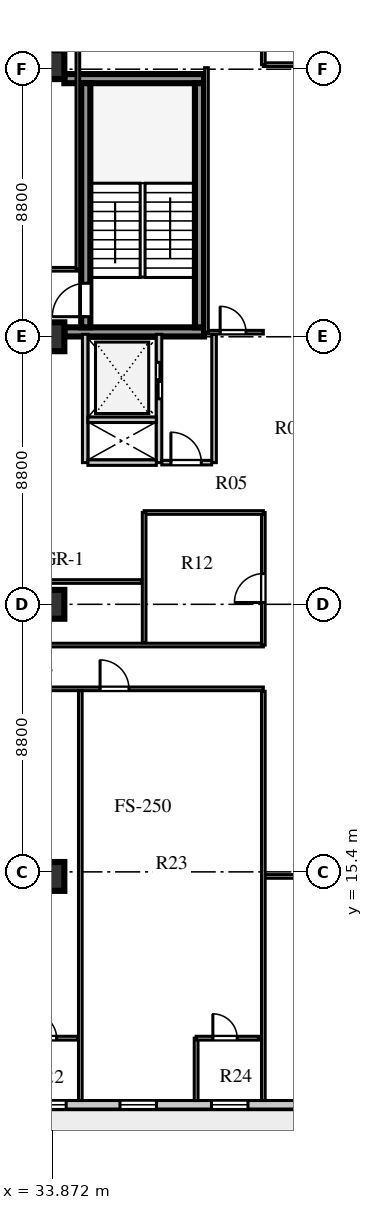
"""IFC4 building model, lengths in metres.
Left out: names, types, materials, properties, quantities, classifications, styles, units other than length and angle.
Written with IfcOpenShell. Run it as: python <this file> out.ifc"""

import sys

from ifc_helpers import new_model, si_unit, direction, frame, frame_2d, origin, origin_2d, place, context, subcontext, project, spatial, rectangle, extrude, element, fill, save


model = new_model("IFC4")
c1 = context("Model", 3, precision=1e-05, world=origin(), true_north=direction((0.0, 1.0)))
c2 = subcontext(c1, "Body", "Model", "MODEL_VIEW")
j1 = project(units=[si_unit("LENGTHUNIT", "METRE"), si_unit("PLANEANGLEUNIT", "RADIAN")], contexts=[c1])
p1 = place(None, origin())
s1 = spatial("IfcSite", under=j1, at=p1, CompositionType="ELEMENT")
p2 = place(p1, origin())
s2 = spatial("IfcBuilding", under=s1, at=p2, CompositionType="ELEMENT")
p3 = place(p2, frame((0.0, 0.0, 173.3)))
s3 = spatial("IfcBuildingStorey", under=s2, at=p3, CompositionType="ELEMENT", Elevation=173.3)
for number, where, z_axis, x_axis in (
    (1, (34.275, 33.16, 0.0), (0.0, 0.0, 1.0), (1.0, 0.0, 0.0)),
    (2, (34.275, 41.49, 0.0), (0.0, 0.0, 1.0), (1.0, 0.0, 0.0)),
):
    element("IfcWall", number, at=place(p3, frame(where, z_axis=z_axis, x_axis=x_axis)), inside=s3, PredefinedType="SHEAR", context=c2, shape_type="SweptSolid", body=[
        extrude(rectangle(XDim=4.595, YDim=0.3, at=frame_2d((2.298, 0.0))), origin(), (0.0, 0.0, 1.0), 3.6),
    ])
p4 = place(p3, frame((34.98, 33.31, 0.0), z_axis=(0.0, 0.0, 1.0), x_axis=(0.0, 1.0, 0.0)))
e3 = element("IfcWall", 3, at=p4, inside=s3, PredefinedType="SHEAR", context=c2, shape_type="SweptSolid", body=[
    extrude(rectangle(XDim=8.03, YDim=0.3, at=frame_2d((4.015, 0.0))), origin(), (0.0, 0.0, 1.0), 3.6),
])
p5 = place(p4, frame((0.35, 0.0, 0.0)))
e4 = element("IfcOpeningElement", 4, at=p5, cuts=e3, PredefinedType="OPENING", context=c2, shape_type="SweptSolid", body=[
    extrude(rectangle(XDim=1.1, YDim=2.1, at=frame_2d((0.55, 1.05))), frame((0.0, 0.16, 0.0), z_axis=(0.0, -1.0, 0.0), x_axis=(1.0, 0.0, 0.0)), (0.0, 0.0, 1.0), 0.32),
])
p6 = place(p3, frame((38.72, 33.31, 0.0), z_axis=(0.0, 0.0, 1.0), x_axis=(0.0, 1.0, 0.0)))
e5 = element("IfcWall", 5, at=p6, inside=s3, PredefinedType="SHEAR", context=c2, shape_type="SweptSolid", body=[
    extrude(rectangle(XDim=8.03, YDim=0.3, at=frame_2d((4.015, 0.0))), origin(), (0.0, 0.0, 1.0), 3.6),
])
for number, where, z_axis, x_axis in (
    (6, (33.8, 15.25, 0.0), (0.0, 0.0, 1.0), (1.0, 0.0, 0.0)),
    (7, (33.8, 24.2, 0.0), (0.0, 0.0, 1.0), (1.0, 0.0, 0.0)),
    (8, (33.8, 33.0, 0.0), (0.0, 0.0, 1.0), (1.0, 0.0, 0.0)),
    (9, (33.8, 41.95, 0.0), (0.0, 0.0, 1.0), (1.0, 0.0, 0.0)),
):
    element("IfcColumn", number, at=place(p3, frame(where, z_axis=z_axis, x_axis=x_axis)), inside=s3, PredefinedType="COLUMN", context=c2, shape_type="SweptSolid", body=[
        extrude(rectangle(XDim=0.95, YDim=0.95, at=origin_2d()), origin(), (0.0, 0.0, 1.0), 3.6),
    ])
p7 = place(p3, frame((13.05, 7.74, 0.0), z_axis=(0.0, 0.0, 1.0), x_axis=(1.0, 0.0, 0.0)))
e10 = element("IfcWall", 10, at=p7, inside=s3, PredefinedType="STANDARD", context=c2, shape_type="SweptSolid", body=[
    extrude(rectangle(XDim=32.5, YDim=0.28, at=frame_2d((16.25, 0.0))), origin(), (0.0, 0.0, 1.0), 3.6),
])
p8 = place(p7, frame((0.95, 0.0, 0.0)))
e11 = element("IfcOpeningElement", 11, at=p8, cuts=e10, PredefinedType="OPENING", context=c2, shape_type="SweptSolid", body=[
    extrude(rectangle(XDim=1.0, YDim=2.05, at=frame_2d((0.5, 1.025))), frame((0.0, 0.15, 0.0), z_axis=(0.0, -1.0, 0.0), x_axis=(1.0, 0.0, 0.0)), (0.0, 0.0, 1.0), 0.3),
])
p9 = place(p7, frame((6.205, 0.0, 0.8)))
e12 = element("IfcOpeningElement", 12, at=p9, cuts=e10, PredefinedType="OPENING", context=c2, shape_type="SweptSolid", body=[
    extrude(rectangle(XDim=1.65, YDim=1.95, at=frame_2d((0.825, 0.975))), frame((0.0, 0.15, 0.0), z_axis=(0.0, -1.0, 0.0), x_axis=(1.0, 0.0, 0.0)), (0.0, 0.0, 1.0), 0.3),
])
p10 = place(p7, frame((12.72, 0.0, 0.8)))
e13 = element("IfcOpeningElement", 13, at=p10, cuts=e10, PredefinedType="OPENING", context=c2, shape_type="SweptSolid", body=[
    extrude(rectangle(XDim=0.95, YDim=1.65, at=frame_2d((0.475, 0.825))), frame((0.0, 0.15, 0.0), z_axis=(0.0, -1.0, 0.0), x_axis=(1.0, 0.0, 0.0)), (0.0, 0.0, 1.0), 0.3),
])
p11 = place(p7, frame((14.685, 0.0, 0.8)))
e14 = element("IfcOpeningElement", 14, at=p11, cuts=e10, PredefinedType="OPENING", context=c2, shape_type="SweptSolid", body=[
    extrude(rectangle(XDim=1.2, YDim=1.75, at=frame_2d((0.6, 0.875))), frame((0.0, 0.15, 0.0), z_axis=(0.0, -1.0, 0.0), x_axis=(1.0, 0.0, 0.0)), (0.0, 0.0, 1.0), 0.3),
])
p12 = place(p7, frame((17.085, 0.0, 0.8)))
e15 = element("IfcOpeningElement", 15, at=p12, cuts=e10, PredefinedType="OPENING", context=c2, shape_type="SweptSolid", body=[
    extrude(rectangle(XDim=1.8, YDim=2.0, at=frame_2d((0.9, 1.0))), frame((0.0, 0.15, 0.0), z_axis=(0.0, -1.0, 0.0), x_axis=(1.0, 0.0, 0.0)), (0.0, 0.0, 1.0), 0.3),
])
p13 = place(p7, frame((20.085, 0.0, 0.8)))
e16 = element("IfcOpeningElement", 16, at=p13, cuts=e10, PredefinedType="OPENING", context=c2, shape_type="SweptSolid", body=[
    extrude(rectangle(XDim=1.2, YDim=1.75, at=frame_2d((0.6, 0.875))), frame((0.0, 0.15, 0.0), z_axis=(0.0, -1.0, 0.0), x_axis=(1.0, 0.0, 0.0)), (0.0, 0.0, 1.0), 0.3),
])
p14 = place(p7, frame((23.055, 0.0, 0.8)))
e17 = element("IfcOpeningElement", 17, at=p14, cuts=e10, PredefinedType="OPENING", context=c2, shape_type="SweptSolid", body=[
    extrude(rectangle(XDim=1.2, YDim=1.75, at=frame_2d((0.6, 0.875))), frame((0.0, 0.15, 0.0), z_axis=(0.0, -1.0, 0.0), x_axis=(1.0, 0.0, 0.0)), (0.0, 0.0, 1.0), 0.3),
])
p15 = place(p7, frame((26.065, 0.0, 0.8)))
e18 = element("IfcOpeningElement", 18, at=p15, cuts=e10, PredefinedType="OPENING", context=c2, shape_type="SweptSolid", body=[
    extrude(rectangle(XDim=1.2, YDim=1.75, at=frame_2d((0.6, 0.875))), frame((0.0, 0.15, 0.0), z_axis=(0.0, -1.0, 0.0), x_axis=(1.0, 0.0, 0.0)), (0.0, 0.0, 1.0), 0.3),
])
p16 = place(p7, frame((29.03, 0.0, 0.8)))
e19 = element("IfcOpeningElement", 19, at=p16, cuts=e10, PredefinedType="OPENING", context=c2, shape_type="SweptSolid", body=[
    extrude(rectangle(XDim=2.1, YDim=1.95, at=frame_2d((1.05, 0.975))), frame((0.0, 0.15, 0.0), z_axis=(0.0, -1.0, 0.0), x_axis=(1.0, 0.0, 0.0)), (0.0, 0.0, 1.0), 0.3),
])
p17 = place(p3, frame((34.96, 28.86, 0.0), z_axis=(0.0, 0.0, 1.0), x_axis=(0.0, 1.0, 0.0)))
e20 = element("IfcWall", 20, at=p17, inside=s3, PredefinedType="SOLIDWALL", context=c2, shape_type="SweptSolid", body=[
    extrude(rectangle(XDim=4.22, YDim=0.18, at=frame_2d((2.11, 0.0))), origin(), (0.0, 0.0, 1.0), 3.6),
])
p18 = place(p3, frame((37.39, 28.86, 0.0), z_axis=(0.0, 0.0, 1.0), x_axis=(0.0, 1.0, 0.0)))
e21 = element("IfcWall", 21, at=p18, inside=s3, PredefinedType="SOLIDWALL", context=c2, shape_type="SweptSolid", body=[
    extrude(rectangle(XDim=4.22, YDim=0.18, at=frame_2d((2.11, 0.0))), origin(), (0.0, 0.0, 1.0), 3.6),
])
p19 = place(p18, frame((2.1, 0.0, 0.0)))
e22 = element("IfcOpeningElement", 22, at=p19, cuts=e21, PredefinedType="OPENING", context=c2, shape_type="SweptSolid", body=[
    extrude(rectangle(XDim=1.2, YDim=2.12, at=frame_2d((0.6, 1.06))), frame((0.0, 0.1, 0.0), z_axis=(0.0, -1.0, 0.0), x_axis=(1.0, 0.0, 0.0)), (0.0, 0.0, 1.0), 0.2),
])
for number, where, z_axis, x_axis in (
    (23, (35.05, 28.86, 0.0), (0.0, 0.0, 1.0), (1.0, 0.0, 0.0)),
    (24, (35.05, 30.27, 0.0), (0.0, 0.0, 1.0), (1.0, 0.0, 0.0)),
):
    element("IfcWall", number, at=place(p3, frame(where, z_axis=z_axis, x_axis=x_axis)), inside=s3, PredefinedType="SOLIDWALL", context=c2, shape_type="SweptSolid", body=[
        extrude(rectangle(XDim=2.25, YDim=0.18, at=frame_2d((1.125, 0.0))), origin(), (0.0, 0.0, 1.0), 3.6),
    ])
p20 = place(p3, frame((39.2, 28.86, 0.0), z_axis=(0.0, 0.0, 1.0), x_axis=(0.0, 1.0, 0.0)))
e25 = element("IfcWall", 25, at=p20, inside=s3, PredefinedType="PARTITIONING", context=c2, shape_type="SweptSolid", body=[
    extrude(rectangle(XDim=4.22, YDim=0.15, at=frame_2d((2.11, 0.0))), origin(), (0.0, 0.0, 1.0), 3.6),
])
p21 = place(p3, frame((37.48, 28.86, 0.0), z_axis=(0.0, 0.0, 1.0), x_axis=(1.0, 0.0, 0.0)))
e26 = element("IfcWall", 26, at=p21, inside=s3, PredefinedType="PARTITIONING", context=c2, shape_type="SweptSolid", body=[
    extrude(rectangle(XDim=1.64, YDim=0.15, at=frame_2d((0.82, 0.0))), origin(), (0.0, 0.0, 1.0), 3.6),
])
p22 = place(p21, frame((0.3, 0.0, 0.0)))
e27 = element("IfcOpeningElement", 27, at=p22, cuts=e26, PredefinedType="OPENING", context=c2, shape_type="SweptSolid", body=[
    extrude(rectangle(XDim=1.0, YDim=2.1, at=frame_2d((0.5, 1.05))), frame((0.0, 0.085, 0.0), z_axis=(0.0, -1.0, 0.0), x_axis=(1.0, 0.0, 0.0)), (0.0, 0.0, 1.0), 0.17),
])
p23 = place(p3, frame((25.22, 21.42, 0.0), z_axis=(0.0, 0.0, 1.0), x_axis=(1.0, 0.0, 0.0)))
e28 = element("IfcWall", 28, at=p23, inside=s3, PredefinedType="PARTITIONING", context=c2, shape_type="SweptSolid", body=[
    extrude(rectangle(XDim=15.6, YDim=0.12, at=frame_2d((7.8, 0.0))), origin(), (0.0, 0.0, 1.0), 3.25),
])
p24 = place(p23, frame((0.73, 0.0, 0.0)))
e29 = element("IfcOpeningElement", 29, at=p24, cuts=e28, PredefinedType="OPENING", context=c2, shape_type="SweptSolid", body=[
    extrude(rectangle(XDim=0.95, YDim=2.1, at=frame_2d((0.475, 1.05))), frame((0.0, 0.07, 0.0), z_axis=(0.0, -1.0, 0.0), x_axis=(1.0, 0.0, 0.0)), (0.0, 0.0, 1.0), 0.14),
])
p25 = place(p23, frame((4.83, 0.0, 0.0)))
e30 = element("IfcOpeningElement", 30, at=p25, cuts=e28, PredefinedType="OPENING", context=c2, shape_type="SweptSolid", body=[
    extrude(rectangle(XDim=0.95, YDim=2.1, at=frame_2d((0.475, 1.05))), frame((0.0, 0.07, 0.0), z_axis=(0.0, -1.0, 0.0), x_axis=(1.0, 0.0, 0.0)), (0.0, 0.0, 1.0), 0.14),
])
p26 = place(p23, frame((10.23, 0.0, 0.0)))
e31 = element("IfcOpeningElement", 31, at=p26, cuts=e28, PredefinedType="OPENING", context=c2, shape_type="SweptSolid", body=[
    extrude(rectangle(XDim=0.95, YDim=2.1, at=frame_2d((0.475, 1.05))), frame((0.0, 0.07, 0.0), z_axis=(0.0, -1.0, 0.0), x_axis=(1.0, 0.0, 0.0)), (0.0, 0.0, 1.0), 0.14),
])
p27 = place(p3, frame((27.15, 22.86, 0.0), z_axis=(0.0, 0.0, 1.0), x_axis=(1.0, 0.0, 0.0)))
e32 = element("IfcWall", 32, at=p27, inside=s3, PredefinedType="PARTITIONING", context=c2, shape_type="SweptSolid", body=[
    extrude(rectangle(XDim=13.67, YDim=0.12, at=frame_2d((6.835, 0.0))), origin(), (0.0, 0.0, 1.0), 3.6),
])
p28 = place(p27, frame((2.2, 0.0, 0.0)))
e33 = element("IfcOpeningElement", 33, at=p28, cuts=e32, PredefinedType="OPENING", context=c2, shape_type="SweptSolid", body=[
    extrude(rectangle(XDim=0.9, YDim=2.08, at=frame_2d((0.45, 1.04))), frame((0.0, 0.07, 0.0), z_axis=(0.0, -1.0, 0.0), x_axis=(1.0, 0.0, 0.0)), (0.0, 0.0, 1.0), 0.14),
])
p29 = place(p3, frame((25.22, 35.22, 0.0), z_axis=(0.0, 0.0, 1.0), x_axis=(1.0, 0.0, 0.0)))
e34 = element("IfcWall", 34, at=p29, inside=s3, PredefinedType="PARTITIONING", context=c2, shape_type="SweptSolid", body=[
    extrude(rectangle(XDim=9.5, YDim=0.12, at=frame_2d((4.75, 0.0))), origin(), (0.0, 0.0, 1.0), 3.6),
])
p30 = place(p29, frame((0.65, 0.0, 0.0)))
e35 = element("IfcOpeningElement", 35, at=p30, cuts=e34, PredefinedType="OPENING", context=c2, shape_type="SweptSolid", body=[
    extrude(rectangle(XDim=0.95, YDim=2.1, at=frame_2d((0.475, 1.05))), frame((0.0, 0.07, 0.0), z_axis=(0.0, -1.0, 0.0), x_axis=(1.0, 0.0, 0.0)), (0.0, 0.0, 1.0), 0.14),
])
p31 = place(p29, frame((5.4, 0.0, 0.0)))
e36 = element("IfcOpeningElement", 36, at=p31, cuts=e34, PredefinedType="OPENING", context=c2, shape_type="SweptSolid", body=[
    extrude(rectangle(XDim=1.05, YDim=2.1, at=frame_2d((0.525, 1.05))), frame((0.0, 0.07, 0.0), z_axis=(0.0, -1.0, 0.0), x_axis=(1.0, 0.0, 0.0)), (0.0, 0.0, 1.0), 0.14),
])
for number, where, z_axis, x_axis in (
    (37, (40.82, 15.25, 0.0), (0.0, 0.0, 1.0), (1.0, 0.0, 0.0)),
    (38, (40.82, 41.95, 0.0), (0.0, 0.0, 1.0), (1.0, 0.0, 0.0)),
):
    element("IfcWall", number, at=place(p3, frame(where, z_axis=z_axis, x_axis=x_axis)), inside=s3, PredefinedType="PARTITIONING", context=c2, shape_type="SweptSolid", body=[
        extrude(rectangle(XDim=9.7, YDim=0.12, at=frame_2d((4.85, 0.0))), origin(), (0.0, 0.0, 1.0), 2.95),
    ])
p32 = place(p3, frame((40.82, 22.86, 0.0), z_axis=(0.0, 0.0, 1.0), x_axis=(0.0, 1.0, 0.0)))
e39 = element("IfcWall", 39, at=p32, inside=s3, PredefinedType="PARTITIONING", context=c2, shape_type="SweptSolid", body=[
    extrude(rectangle(XDim=4.36, YDim=0.12, at=frame_2d((2.18, 0.0))), origin(), (0.0, 0.0, 1.0), 3.6),
])
p33 = place(p32, frame((1.4, 0.0, 0.0)))
e40 = element("IfcOpeningElement", 40, at=p33, cuts=e39, PredefinedType="OPENING", context=c2, shape_type="SweptSolid", body=[
    extrude(rectangle(XDim=0.95, YDim=2.1, at=frame_2d((0.475, 1.05))), frame((0.0, 0.07, 0.0), z_axis=(0.0, -1.0, 0.0), x_axis=(1.0, 0.0, 0.0)), (0.0, 0.0, 1.0), 0.14),
])
p34 = place(p3, frame((36.9, 27.22, 0.0), z_axis=(0.0, 0.0, 1.0), x_axis=(1.0, 0.0, 0.0)))
e41 = element("IfcWall", 41, at=p34, inside=s3, PredefinedType="PARTITIONING", context=c2, shape_type="SweptSolid", body=[
    extrude(rectangle(XDim=3.92, YDim=0.12, at=frame_2d((1.96, 0.0))), origin(), (0.0, 0.0, 1.0), 3.25),
])
p35 = place(p3, frame((36.9, 22.94, 0.0), z_axis=(0.0, 0.0, 1.0), x_axis=(0.0, 1.0, 0.0)))
e42 = element("IfcWall", 42, at=p35, inside=s3, PredefinedType="PARTITIONING", context=c2, shape_type="SweptSolid", body=[
    extrude(rectangle(XDim=4.28, YDim=0.12, at=frame_2d((2.14, 0.0))), origin(), (0.0, 0.0, 1.0), 3.6),
])
p36 = place(p3, frame((27.15, 24.95, 0.0), z_axis=(0.0, 0.0, 1.0), x_axis=(1.0, 0.0, 0.0)))
e43 = element("IfcWall", 43, at=p36, inside=s3, PredefinedType="PARTITIONING", context=c2, shape_type="SweptSolid", body=[
    extrude(rectangle(XDim=9.67, YDim=0.12, at=frame_2d((4.835, 0.0))), origin(), (0.0, 0.0, 1.0), 3.05),
])
p37 = place(p3, frame((40.82, 7.88, 0.0), z_axis=(0.0, 0.0, 1.0), x_axis=(0.0, 1.0, 0.0)))
e44 = element("IfcWall", 44, at=p37, inside=s3, PredefinedType="PARTITIONING", context=c2, shape_type="SweptSolid", body=[
    extrude(rectangle(XDim=13.46, YDim=0.12, at=frame_2d((6.73, 0.0))), origin(), (0.0, 0.0, 1.0), 3.6),
])
p38 = place(p3, frame((32.67, 9.93, 0.0), z_axis=(0.0, 0.0, 1.0), x_axis=(1.0, 0.0, 0.0)))
e45 = element("IfcWall", 45, at=p38, inside=s3, PredefinedType="PLUMBINGWALL", context=c2, shape_type="SweptSolid", body=[
    extrude(rectangle(XDim=2.05, YDim=0.125, at=frame_2d((1.025, 0.0))), origin(), (0.0, 0.0, 1.0), 3.6),
])
p39 = place(p38, frame((0.55, 0.0, 0.0)))
e46 = element("IfcOpeningElement", 46, at=p39, cuts=e45, PredefinedType="OPENING", context=c2, shape_type="SweptSolid", body=[
    extrude(rectangle(XDim=0.8, YDim=2.05, at=frame_2d((0.4, 1.025))), frame((0.0, 0.073, 0.0), z_axis=(0.0, -1.0, 0.0), x_axis=(1.0, 0.0, 0.0)), (0.0, 0.0, 1.0), 0.145),
])
p40 = place(p3, frame((34.8, 7.88, 0.0), z_axis=(0.0, 0.0, 1.0), x_axis=(0.0, 1.0, 0.0)))
e47 = element("IfcWall", 47, at=p40, inside=s3, PredefinedType="PARTITIONING", context=c2, shape_type="SweptSolid", body=[
    extrude(rectangle(XDim=13.48, YDim=0.12, at=frame_2d((6.74, 0.0))), origin(), (0.0, 0.0, 1.0), 3.6),
])
p41 = place(p3, frame((38.61, 7.88, 0.0), z_axis=(0.0, 0.0, 1.0), x_axis=(0.0, 1.0, 0.0)))
e48 = element("IfcWall", 48, at=p41, inside=s3, PredefinedType="PLUMBINGWALL", context=c2, shape_type="SweptSolid", body=[
    extrude(rectangle(XDim=2.05, YDim=0.125, at=frame_2d((1.025, 0.0))), origin(), (0.0, 0.0, 1.0), 3.6),
])
p42 = place(p3, frame((38.61, 9.93, 0.0), z_axis=(0.0, 0.0, 1.0), x_axis=(1.0, 0.0, 0.0)))
e49 = element("IfcWall", 49, at=p42, inside=s3, PredefinedType="PLUMBINGWALL", context=c2, shape_type="SweptSolid", body=[
    extrude(rectangle(XDim=2.05, YDim=0.125, at=frame_2d((1.025, 0.0))), origin(), (0.0, 0.0, 1.0), 3.6),
])
p43 = place(p42, frame((0.55, 0.0, 0.0)))
e50 = element("IfcOpeningElement", 50, at=p43, cuts=e49, PredefinedType="OPENING", context=c2, shape_type="SweptSolid", body=[
    extrude(rectangle(XDim=0.8, YDim=2.05, at=frame_2d((0.4, 1.025))), frame((0.0, 0.073, 0.0), z_axis=(0.0, -1.0, 0.0), x_axis=(1.0, 0.0, 0.0)), (0.0, 0.0, 1.0), 0.145),
])
p44 = place(p3, frame((34.72, 35.22, 0.0), z_axis=(0.0, 0.0, 1.0), x_axis=(0.0, 1.0, 0.0)))
e51 = element("IfcWall", 51, at=p44, inside=s3, PredefinedType="PARTITIONING", context=c2, shape_type="SweptSolid", body=[
    extrude(rectangle(XDim=14.1, YDim=0.12, at=frame_2d((7.05, 0.0))), origin(), (0.0, 0.0, 1.0), 3.6),
])
p45 = place(p3, frame((38.95, 33.15, 0.0), z_axis=(0.0, 0.0, 1.0), x_axis=(1.0, 0.0, 0.0)))
e52 = element("IfcWall", 52, at=p45, inside=s3, PredefinedType="PARTITIONING", context=c2, shape_type="SweptSolid", body=[
    extrude(rectangle(XDim=1.87, YDim=0.12, at=frame_2d((0.935, 0.0))), origin(), (0.0, 0.0, 1.0), 3.6),
])
p46 = place(p45, frame((0.45, 0.0, 0.0)))
e53 = element("IfcOpeningElement", 53, at=p46, cuts=e52, PredefinedType="OPENING", context=c2, shape_type="SweptSolid", body=[
    extrude(rectangle(XDim=0.85, YDim=2.05, at=frame_2d((0.425, 1.025))), frame((0.0, 0.07, 0.0), z_axis=(0.0, -1.0, 0.0), x_axis=(1.0, 0.0, 0.0)), (0.0, 0.0, 1.0), 0.14),
])
p47 = place(p3, frame((38.95, 33.15, 0.0), z_axis=(0.0, 0.0, 1.0), x_axis=(0.0, 1.0, 0.0)))
e54 = element("IfcWall", 54, at=p47, inside=s3, PredefinedType="PARTITIONING", context=c2, shape_type="SweptSolid", body=[
    extrude(rectangle(XDim=8.7, YDim=0.12, at=frame_2d((4.35, 0.0))), origin(), (0.0, 0.0, 1.0), 3.6),
])
p48 = place(p3, frame((40.82, 41.95, 0.0), z_axis=(0.0, 0.0, 1.0), x_axis=(0.0, 1.0, 0.0)))
e55 = element("IfcWall", 55, at=p48, inside=s3, PredefinedType="PARTITIONING", context=c2, shape_type="SweptSolid", body=[
    extrude(rectangle(XDim=7.37, YDim=0.12, at=frame_2d((3.685, 0.0))), origin(), (0.0, 0.0, 1.0), 3.6),
])
p49 = place(p13, origin())
e56 = element("IfcWindow", 56, at=p49, inside=s3, PartitioningType="SINGLE_PANEL", PredefinedType="WINDOW", context=c2, shape_type="SweptSolid", body=[
    extrude(rectangle(XDim=1.2, YDim=1.75, at=frame_2d((0.6, 0.875))), frame((0.0, 0.03, 0.0), z_axis=(0.0, -1.0, 0.0), x_axis=(1.0, 0.0, 0.0)), (0.0, 0.0, 1.0), 0.06),
])
fill(e16, e56)
p50 = place(p14, origin())
e57 = element("IfcWindow", 57, at=p50, inside=s3, PartitioningType="SINGLE_PANEL", PredefinedType="WINDOW", context=c2, shape_type="SweptSolid", body=[
    extrude(rectangle(XDim=1.2, YDim=1.75, at=frame_2d((0.6, 0.875))), frame((0.0, 0.03, 0.0), z_axis=(0.0, -1.0, 0.0), x_axis=(1.0, 0.0, 0.0)), (0.0, 0.0, 1.0), 0.06),
])
fill(e17, e57)
p51 = place(p15, origin())
e58 = element("IfcWindow", 58, at=p51, inside=s3, PartitioningType="SINGLE_PANEL", PredefinedType="WINDOW", context=c2, shape_type="SweptSolid", body=[
    extrude(rectangle(XDim=1.2, YDim=1.75, at=frame_2d((0.6, 0.875))), frame((0.0, 0.03, 0.0), z_axis=(0.0, -1.0, 0.0), x_axis=(1.0, 0.0, 0.0)), (0.0, 0.0, 1.0), 0.06),
])
fill(e18, e58)
p52 = place(p5, origin())
e59 = element("IfcDoor", 59, at=p52, inside=s3, OperationType="SINGLE_SWING_LEFT", PredefinedType="DOOR", context=c2, shape_type="SweptSolid", body=[
    extrude(rectangle(XDim=1.1, YDim=2.1, at=frame_2d((0.55, 1.05))), frame((0.0, 0.025, 0.0), z_axis=(0.0, -1.0, 0.0), x_axis=(1.0, 0.0, 0.0)), (0.0, 0.0, 1.0), 0.05),
])
fill(e4, e59)
p53 = place(p19, frame((1.2, 0.0, 0.0), z_axis=(0.0, 0.0, 1.0), x_axis=(-1.0, 0.0, 0.0)))
e60 = element("IfcDoor", 60, at=p53, inside=s3, OperationType="DOUBLE_DOOR_SLIDING", PredefinedType="DOOR", context=c2, shape_type="SweptSolid", body=[
    extrude(rectangle(XDim=1.2, YDim=2.12, at=frame_2d((0.6, 1.06))), frame((0.0, 0.025, 0.0), z_axis=(0.0, -1.0, 0.0), x_axis=(1.0, 0.0, 0.0)), (0.0, 0.0, 1.0), 0.05),
])
fill(e22, e60)
p54 = place(p22, origin())
e61 = element("IfcDoor", 61, at=p54, inside=s3, OperationType="SINGLE_SWING_LEFT", PredefinedType="DOOR", context=c2, shape_type="SweptSolid", body=[
    extrude(rectangle(XDim=1.0, YDim=2.1, at=frame_2d((0.5, 1.05))), frame((0.0, 0.025, 0.0), z_axis=(0.0, -1.0, 0.0), x_axis=(1.0, 0.0, 0.0)), (0.0, 0.0, 1.0), 0.05),
])
fill(e27, e61)
p55 = place(p33, frame((0.95, 0.0, 0.0), z_axis=(0.0, 0.0, 1.0), x_axis=(-1.0, 0.0, 0.0)))
e62 = element("IfcDoor", 62, at=p55, inside=s3, OperationType="SINGLE_SWING_RIGHT", PredefinedType="DOOR", context=c2, shape_type="SweptSolid", body=[
    extrude(rectangle(XDim=0.95, YDim=2.1, at=frame_2d((0.475, 1.05))), frame((0.0, 0.025, 0.0), z_axis=(0.0, -1.0, 0.0), x_axis=(1.0, 0.0, 0.0)), (0.0, 0.0, 1.0), 0.05),
])
fill(e40, e62)
p56 = place(p39, origin())
e63 = element("IfcDoor", 63, at=p56, inside=s3, OperationType="SINGLE_SWING_LEFT", PredefinedType="DOOR", context=c2, shape_type="SweptSolid", body=[
    extrude(rectangle(XDim=0.8, YDim=2.05, at=frame_2d((0.4, 1.025))), frame((0.0, 0.025, 0.0), z_axis=(0.0, -1.0, 0.0), x_axis=(1.0, 0.0, 0.0)), (0.0, 0.0, 1.0), 0.05),
])
fill(e46, e63)
p57 = place(p26, frame((0.95, 0.0, 0.0), z_axis=(0.0, 0.0, 1.0), x_axis=(-1.0, 0.0, 0.0)))
e64 = element("IfcDoor", 64, at=p57, inside=s3, OperationType="SINGLE_SWING_RIGHT", PredefinedType="DOOR", context=c2, shape_type="SweptSolid", body=[
    extrude(rectangle(XDim=0.95, YDim=2.1, at=frame_2d((0.475, 1.05))), frame((0.0, 0.025, 0.0), z_axis=(0.0, -1.0, 0.0), x_axis=(1.0, 0.0, 0.0)), (0.0, 0.0, 1.0), 0.05),
])
fill(e31, e64)
p58 = place(p43, origin())
e65 = element("IfcDoor", 65, at=p58, inside=s3, OperationType="SINGLE_SWING_LEFT", PredefinedType="DOOR", context=c2, shape_type="SweptSolid", body=[
    extrude(rectangle(XDim=0.8, YDim=2.05, at=frame_2d((0.4, 1.025))), frame((0.0, 0.025, 0.0), z_axis=(0.0, -1.0, 0.0), x_axis=(1.0, 0.0, 0.0)), (0.0, 0.0, 1.0), 0.05),
])
fill(e50, e65)
p59 = place(p46, origin())
e66 = element("IfcDoor", 66, at=p59, inside=s3, OperationType="SINGLE_SWING_LEFT", PredefinedType="DOOR", context=c2, shape_type="SweptSolid", body=[
    extrude(rectangle(XDim=0.85, YDim=2.05, at=frame_2d((0.425, 1.025))), frame((0.0, 0.025, 0.0), z_axis=(0.0, -1.0, 0.0), x_axis=(1.0, 0.0, 0.0)), (0.0, 0.0, 1.0), 0.05),
])
fill(e53, e66)
save(model, sys.argv[1])
